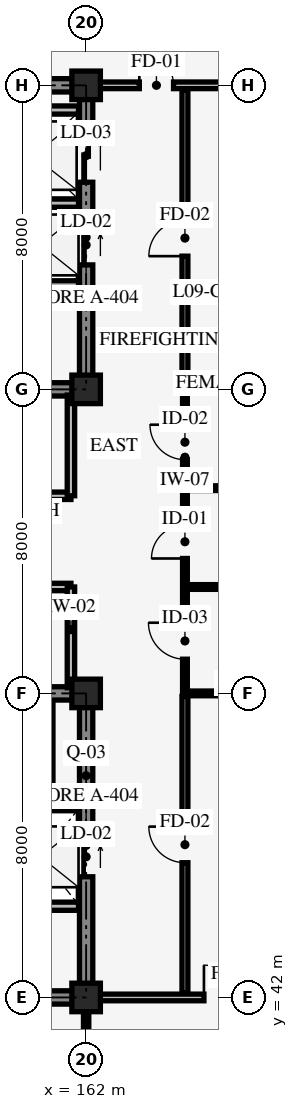
"""IFC4 building model, lengths in metres.
Left out: names, types, materials, properties, quantities, classifications, styles, units other than length and angle.
Written with IfcOpenShell. Run it as: python <this file> out.ifc"""

import sys

from ifc_helpers import new_model, si_unit, direction, frame, frame_2d, origin, origin_2d, place, context, subcontext, project, spatial, rectangle, extrude, element, fill, save


model = new_model("IFC4")
c1 = context("Model", 3, precision=1e-05, world=origin(), true_north=direction((0.0, 1.0)))
c2 = subcontext(c1, "Body", "Model", "MODEL_VIEW")
j1 = project(units=[si_unit("LENGTHUNIT", "METRE"), si_unit("PLANEANGLEUNIT", "RADIAN")], contexts=[c1])
p1 = place(None, origin())
s1 = spatial("IfcSite", under=j1, at=p1, CompositionType="ELEMENT")
p2 = place(p1, origin())
s2 = spatial("IfcBuilding", under=s1, at=p2, CompositionType="ELEMENT")
p3 = place(p2, frame((0.0, 0.0, 36.0)))
s3 = spatial("IfcBuildingStorey", under=s2, at=p3, CompositionType="ELEMENT", Elevation=36.0)
p4 = place(p3, frame((154.0, 42.0, 0.0), z_axis=(0.0, 0.0, 1.0), x_axis=(1.0, 0.0, 0.0)))
e1 = element("IfcWall", 1, at=p4, inside=s3, PredefinedType="SHEAR", context=c2, shape_type="SweptSolid", body=[
    extrude(rectangle(XDim=8.0, YDim=0.35, at=frame_2d((4.0, 0.0))), origin(), (0.0, 0.0, 1.0), 3.95),
])
p5 = place(p3, frame((162.0, 42.0, 0.0), z_axis=(0.0, 0.0, 1.0), x_axis=(0.0, 1.0, 0.0)))
e2 = element("IfcWall", 2, at=p5, inside=s3, PredefinedType="SHEAR", context=c2, shape_type="SweptSolid", body=[
    extrude(rectangle(XDim=8.0, YDim=0.35, at=frame_2d((4.0, 0.0))), origin(), (0.0, 0.0, 1.0), 3.95),
])
p6 = place(p5, frame((3.175, 0.0, 0.0)))
e3 = element("IfcOpeningElement", 3, at=p6, cuts=e2, PredefinedType="OPENING", context=c2, shape_type="SweptSolid", body=[
    extrude(rectangle(XDim=1.05, YDim=2.2, at=frame_2d((0.525, 1.1))), frame((0.0, 0.185, 0.0), z_axis=(0.0, -1.0, 0.0), x_axis=(1.0, 0.0, 0.0)), (0.0, 0.0, 1.0), 0.37),
])
p7 = place(p3, frame((162.0, 50.0, 0.0), z_axis=(0.0, 0.0, 1.0), x_axis=(-1.0, 0.0, 0.0)))
e4 = element("IfcWall", 4, at=p7, inside=s3, PredefinedType="SHEAR", context=c2, shape_type="SweptSolid", body=[
    extrude(rectangle(XDim=8.0, YDim=0.35, at=frame_2d((4.0, 0.0))), origin(), (0.0, 0.0, 1.0), 3.95),
])
p8 = place(p7, frame((5.3, 0.0, 0.0)))
e5 = element("IfcOpeningElement", 5, at=p8, cuts=e4, PredefinedType="OPENING", context=c2, shape_type="SweptSolid", body=[
    extrude(rectangle(XDim=1.3, YDim=2.15, at=frame_2d((0.65, 1.075))), frame((0.0, 0.185, 0.0), z_axis=(0.0, -1.0, 0.0), x_axis=(1.0, 0.0, 0.0)), (0.0, 0.0, 1.0), 0.37),
])
p9 = place(p7, frame((1.45, 0.0, 0.0)))
e6 = element("IfcOpeningElement", 6, at=p9, cuts=e4, PredefinedType="OPENING", context=c2, shape_type="SweptSolid", body=[
    extrude(rectangle(XDim=1.1, YDim=2.2, at=frame_2d((0.55, 1.1))), frame((0.0, 0.185, 0.0), z_axis=(0.0, -1.0, 0.0), x_axis=(1.0, 0.0, 0.0)), (0.0, 0.0, 1.0), 0.37),
])
p10 = place(p3, frame((154.0, 58.0, 0.0), z_axis=(0.0, 0.0, 1.0), x_axis=(1.0, 0.0, 0.0)))
e7 = element("IfcWall", 7, at=p10, inside=s3, PredefinedType="SHEAR", context=c2, shape_type="SweptSolid", body=[
    extrude(rectangle(XDim=8.0, YDim=0.35, at=frame_2d((4.0, 0.0))), origin(), (0.0, 0.0, 1.0), 3.95),
])
p11 = place(p10, frame((1.4, 0.0, 0.0)))
e8 = element("IfcOpeningElement", 8, at=p11, cuts=e7, PredefinedType="OPENING", context=c2, shape_type="SweptSolid", body=[
    extrude(rectangle(XDim=1.3, YDim=2.15, at=frame_2d((0.65, 1.075))), frame((0.0, 0.185, 0.0), z_axis=(0.0, -1.0, 0.0), x_axis=(1.0, 0.0, 0.0)), (0.0, 0.0, 1.0), 0.37),
])
p12 = place(p10, frame((5.3, 0.0, 0.0)))
e9 = element("IfcOpeningElement", 9, at=p12, cuts=e7, PredefinedType="OPENING", context=c2, shape_type="SweptSolid", body=[
    extrude(rectangle(XDim=1.1, YDim=2.2, at=frame_2d((0.55, 1.1))), frame((0.0, 0.185, 0.0), z_axis=(0.0, -1.0, 0.0), x_axis=(1.0, 0.0, 0.0)), (0.0, 0.0, 1.0), 0.37),
])
p13 = place(p3, frame((162.0, 58.0, 0.0), z_axis=(0.0, 0.0, 1.0), x_axis=(0.0, 1.0, 0.0)))
e10 = element("IfcWall", 10, at=p13, inside=s3, PredefinedType="SHEAR", context=c2, shape_type="SweptSolid", body=[
    extrude(rectangle(XDim=8.0, YDim=0.35, at=frame_2d((4.0, 0.0))), origin(), (0.0, 0.0, 1.0), 3.95),
])
p14 = place(p13, frame((3.275, 0.0, 0.0)))
e11 = element("IfcOpeningElement", 11, at=p14, cuts=e10, PredefinedType="OPENING", context=c2, shape_type="SweptSolid", body=[
    extrude(rectangle(XDim=1.05, YDim=2.2, at=frame_2d((0.525, 1.1))), frame((0.0, 0.185, 0.0), z_axis=(0.0, -1.0, 0.0), x_axis=(1.0, 0.0, 0.0)), (0.0, 0.0, 1.0), 0.37),
])
p15 = place(p13, frame((5.45, 0.0, 0.0)))
e12 = element("IfcOpeningElement", 12, at=p15, cuts=e10, PredefinedType="OPENING", context=c2, shape_type="SweptSolid", body=[
    extrude(rectangle(XDim=1.4, YDim=2.3, at=frame_2d((0.7, 1.15))), frame((0.0, 0.185, 0.0), z_axis=(0.0, -1.0, 0.0), x_axis=(1.0, 0.0, 0.0)), (0.0, 0.0, 1.0), 0.37),
])
p16 = place(p3, frame((162.0, 66.0, 0.0), z_axis=(0.0, 0.0, 1.0), x_axis=(-1.0, 0.0, 0.0)))
e13 = element("IfcWall", 13, at=p16, inside=s3, PredefinedType="SHEAR", context=c2, shape_type="SweptSolid", body=[
    extrude(rectangle(XDim=8.0, YDim=0.35, at=frame_2d((4.0, 0.0))), origin(), (0.0, 0.0, 1.0), 3.95),
])
for number, where, z_axis, x_axis in (
    (14, (162.0, 42.0, 0.0), (0.0, 0.0, 1.0), (1.0, 0.0, 0.0)),
    (15, (162.0, 50.0, 0.0), (0.0, 0.0, 1.0), (1.0, 0.0, 0.0)),
    (16, (162.0, 58.0, 0.0), (0.0, 0.0, 1.0), (1.0, 0.0, 0.0)),
    (17, (162.0, 66.0, 0.0), (0.0, 0.0, 1.0), (1.0, 0.0, 0.0)),
):
    element("IfcColumn", number, at=place(p3, frame(where, z_axis=z_axis, x_axis=x_axis)), inside=s3, PredefinedType="COLUMN", context=c2, shape_type="SweptSolid", body=[
        extrude(rectangle(XDim=0.75, YDim=0.75, at=origin_2d()), origin(), (0.0, 0.0, 1.0), 4.2),
    ])
p17 = place(p3, frame((158.45, 47.02, 0.0), z_axis=(0.0, 0.0, 1.0), x_axis=(1.0, 0.0, 0.0)))
e18 = element("IfcWall", 18, at=p17, inside=s3, PredefinedType="STANDARD", context=c2, shape_type="SweptSolid", body=[
    extrude(rectangle(XDim=3.35, YDim=0.215, at=frame_2d((1.675, 0.0))), origin(), (0.0, 0.0, 1.0), 3.9),
])
p18 = place(p3, frame((161.02, 47.02, 0.0), z_axis=(0.0, 0.0, 1.0), x_axis=(0.0, 1.0, 0.0)))
e19 = element("IfcWall", 19, at=p18, inside=s3, PredefinedType="STANDARD", context=c2, shape_type="SweptSolid", body=[
    extrude(rectangle(XDim=2.78, YDim=0.215, at=frame_2d((1.39, 0.0))), origin(), (0.0, 0.0, 1.0), 3.9),
])
p19 = place(p3, frame((159.78, 44.4, 0.0), z_axis=(0.0, 0.0, 1.0), x_axis=(1.0, 0.0, 0.0)))
e20 = element("IfcWall", 20, at=p19, inside=s3, PredefinedType="STANDARD", context=c2, shape_type="SweptSolid", body=[
    extrude(rectangle(XDim=2.02, YDim=0.215, at=frame_2d((1.01, 0.0))), origin(), (0.0, 0.0, 1.0), 3.9),
])
p20 = place(p3, frame((158.45, 62.9, 0.0), z_axis=(0.0, 0.0, 1.0), x_axis=(1.0, 0.0, 0.0)))
e21 = element("IfcWall", 21, at=p20, inside=s3, PredefinedType="STANDARD", context=c2, shape_type="SweptSolid", body=[
    extrude(rectangle(XDim=3.35, YDim=0.215, at=frame_2d((1.675, 0.0))), origin(), (0.0, 0.0, 1.0), 3.9),
])
p21 = place(p3, frame((159.38, 65.35, 0.0), z_axis=(0.0, 0.0, 1.0), x_axis=(1.0, 0.0, 0.0)))
e22 = element("IfcWall", 22, at=p21, inside=s3, PredefinedType="STANDARD", context=c2, shape_type="SweptSolid", body=[
    extrude(rectangle(XDim=2.42, YDim=0.215, at=frame_2d((1.21, 0.0))), origin(), (0.0, 0.0, 1.0), 3.9),
])
p22 = place(p3, frame((158.45, 60.75, 0.0), z_axis=(0.0, 0.0, 1.0), x_axis=(1.0, 0.0, 0.0)))
e23 = element("IfcWall", 23, at=p22, inside=s3, PredefinedType="STANDARD", context=c2, shape_type="SweptSolid", body=[
    extrude(rectangle(XDim=3.35, YDim=0.215, at=frame_2d((1.675, 0.0))), origin(), (0.0, 0.0, 1.0), 3.9),
])
p23 = place(p3, frame((154.0, 52.8, 0.0), z_axis=(0.0, 0.0, 1.0), x_axis=(1.0, 0.0, 0.0)))
e24 = element("IfcWall", 24, at=p23, inside=s3, PredefinedType="STANDARD", context=c2, shape_type="SweptSolid", body=[
    extrude(rectangle(XDim=7.6, YDim=0.195, at=frame_2d((3.8, 0.0))), origin(), (0.0, 0.0, 1.0), 3.9),
])
p24 = place(p23, frame((2.8, 0.0, 0.0)))
e25 = element("IfcOpeningElement", 25, at=p24, cuts=e24, PredefinedType="OPENING", context=c2, shape_type="SweptSolid", body=[
    extrude(rectangle(XDim=1.35, YDim=2.15, at=frame_2d((0.675, 1.075))), frame((0.0, 0.107, 0.0), z_axis=(0.0, -1.0, 0.0), x_axis=(1.0, 0.0, 0.0)), (0.0, 0.0, 1.0), 0.215),
])
p25 = place(p3, frame((161.6, 50.15, 0.0), z_axis=(0.0, 0.0, 1.0), x_axis=(0.0, 1.0, 0.0)))
e26 = element("IfcWall", 26, at=p25, inside=s3, PredefinedType="STANDARD", context=c2, shape_type="SweptSolid", body=[
    extrude(rectangle(XDim=2.65, YDim=0.195, at=frame_2d((1.325, 0.0))), origin(), (0.0, 0.0, 1.0), 3.14),
])
p26 = place(p3, frame((154.0, 55.2, 0.0), z_axis=(0.0, 0.0, 1.0), x_axis=(1.0, 0.0, 0.0)))
e27 = element("IfcWall", 27, at=p26, inside=s3, PredefinedType="STANDARD", context=c2, shape_type="SweptSolid", body=[
    extrude(rectangle(XDim=7.6, YDim=0.195, at=frame_2d((3.8, 0.0))), origin(), (0.0, 0.0, 1.0), 3.9),
])
p27 = place(p26, frame((2.8, 0.0, 0.0)))
e28 = element("IfcOpeningElement", 28, at=p27, cuts=e27, PredefinedType="OPENING", context=c2, shape_type="SweptSolid", body=[
    extrude(rectangle(XDim=1.45, YDim=2.2, at=frame_2d((0.725, 1.1))), frame((0.0, 0.107, 0.0), z_axis=(0.0, -1.0, 0.0), x_axis=(1.0, 0.0, 0.0)), (0.0, 0.0, 1.0), 0.215),
])
p28 = place(p3, frame((161.6, 55.2, 0.0), z_axis=(0.0, 0.0, 1.0), x_axis=(0.0, 1.0, 0.0)))
e29 = element("IfcWall", 29, at=p28, inside=s3, PredefinedType="STANDARD", context=c2, shape_type="SweptSolid", body=[
    extrude(rectangle(XDim=2.65, YDim=0.195, at=frame_2d((1.325, 0.0))), origin(), (0.0, 0.0, 1.0), 3.14),
])
p29 = place(p3, frame((164.6, 50.0, 0.0), z_axis=(0.0, 0.0, 1.0), x_axis=(0.0, 1.0, 0.0)))
e30 = element("IfcWall", 30, at=p29, inside=s3, PredefinedType="STANDARD", context=c2, shape_type="SweptSolid", body=[
    extrude(rectangle(XDim=8.0, YDim=0.125, at=frame_2d((4.0, 0.0))), origin(), (0.0, 0.0, 1.0), 3.9),
])
p30 = place(p29, frame((0.9, 0.0, 0.0)))
e31 = element("IfcOpeningElement", 31, at=p30, cuts=e30, PredefinedType="OPENING", context=c2, shape_type="SweptSolid", body=[
    extrude(rectangle(XDim=0.96, YDim=2.08, at=frame_2d((0.48, 1.04))), frame((0.0, 0.073, 0.0), z_axis=(0.0, -1.0, 0.0), x_axis=(1.0, 0.0, 0.0)), (0.0, 0.0, 1.0), 0.145),
])
p31 = place(p29, frame((3.55, 0.0, 0.0)))
e32 = element("IfcOpeningElement", 32, at=p31, cuts=e30, PredefinedType="OPENING", context=c2, shape_type="SweptSolid", body=[
    extrude(rectangle(XDim=0.88, YDim=2.05, at=frame_2d((0.44, 1.025))), frame((0.0, 0.073, 0.0), z_axis=(0.0, -1.0, 0.0), x_axis=(1.0, 0.0, 0.0)), (0.0, 0.0, 1.0), 0.145),
])
p32 = place(p29, frame((6.15, 0.0, 0.0)))
e33 = element("IfcOpeningElement", 33, at=p32, cuts=e30, PredefinedType="OPENING", context=c2, shape_type="SweptSolid", body=[
    extrude(rectangle(XDim=0.92, YDim=2.05, at=frame_2d((0.46, 1.025))), frame((0.0, 0.073, 0.0), z_axis=(0.0, -1.0, 0.0), x_axis=(1.0, 0.0, 0.0)), (0.0, 0.0, 1.0), 0.145),
])
p33 = place(p3, frame((164.6, 50.0, 0.0), z_axis=(0.0, 0.0, 1.0), x_axis=(1.0, 0.0, 0.0)))
e34 = element("IfcWall", 34, at=p33, inside=s3, PredefinedType="STANDARD", context=c2, shape_type="SweptSolid", body=[
    extrude(rectangle(XDim=3.8, YDim=0.125, at=frame_2d((1.9, 0.0))), origin(), (0.0, 0.0, 1.0), 3.09),
])
for number, where, z_axis, x_axis in (
    (35, (164.6, 52.8, 0.0), (0.0, 0.0, 1.0), (1.0, 0.0, 0.0)),
    (36, (164.6, 55.4, 0.0), (0.0, 0.0, 1.0), (1.0, 0.0, 0.0)),
):
    element("IfcWall", number, at=place(p3, frame(where, z_axis=z_axis, x_axis=x_axis)), inside=s3, PredefinedType="STANDARD", context=c2, shape_type="SweptSolid", body=[
        extrude(rectangle(XDim=3.8, YDim=0.125, at=frame_2d((1.9, 0.0))), origin(), (0.0, 0.0, 1.0), 3.9),
    ])
p34 = place(p3, frame((164.6, 58.0, 0.0), z_axis=(0.0, 0.0, 1.0), x_axis=(1.0, 0.0, 0.0)))
e37 = element("IfcWall", 37, at=p34, inside=s3, PredefinedType="STANDARD", context=c2, shape_type="SweptSolid", body=[
    extrude(rectangle(XDim=3.8, YDim=0.125, at=frame_2d((1.9, 0.0))), origin(), (0.0, 0.0, 1.0), 3.09),
])
p35 = place(p3, frame((164.6, 42.12, 0.0), z_axis=(0.0, 0.0, 1.0), x_axis=(0.0, 1.0, 0.0)))
e38 = element("IfcWall", 38, at=p35, inside=s3, PredefinedType="STANDARD", context=c2, shape_type="SweptSolid", body=[
    extrude(rectangle(XDim=7.8, YDim=0.155, at=frame_2d((3.9, 0.0))), origin(), (0.0, 0.0, 1.0), 3.9),
])
p36 = place(p35, frame((3.425, 0.0, 0.0)))
e39 = element("IfcOpeningElement", 39, at=p36, cuts=e38, PredefinedType="OPENING", context=c2, shape_type="SweptSolid", body=[
    extrude(rectangle(XDim=0.95, YDim=2.1, at=frame_2d((0.475, 1.05))), frame((0.0, 0.087, 0.0), z_axis=(0.0, -1.0, 0.0), x_axis=(1.0, 0.0, 0.0)), (0.0, 0.0, 1.0), 0.175),
])
p37 = place(p3, frame((164.6, 58.08, 0.0), z_axis=(0.0, 0.0, 1.0), x_axis=(0.0, 1.0, 0.0)))
e40 = element("IfcWall", 40, at=p37, inside=s3, PredefinedType="STANDARD", context=c2, shape_type="SweptSolid", body=[
    extrude(rectangle(XDim=7.8, YDim=0.155, at=frame_2d((3.9, 0.0))), origin(), (0.0, 0.0, 1.0), 3.9),
])
p38 = place(p37, frame((3.425, 0.0, 0.0)))
e41 = element("IfcOpeningElement", 41, at=p38, cuts=e40, PredefinedType="OPENING", context=c2, shape_type="SweptSolid", body=[
    extrude(rectangle(XDim=0.95, YDim=2.1, at=frame_2d((0.475, 1.05))), frame((0.0, 0.087, 0.0), z_axis=(0.0, -1.0, 0.0), x_axis=(1.0, 0.0, 0.0)), (0.0, 0.0, 1.0), 0.175),
])
p39 = place(p3, frame((162.0, 34.05, 0.0), z_axis=(0.0, 0.0, 1.0), x_axis=(0.0, 1.0, 0.0)))
e42 = element("IfcWall", 42, at=p39, inside=s3, PredefinedType="STANDARD", context=c2, shape_type="SweptSolid", body=[
    extrude(rectangle(XDim=7.83, YDim=0.14, at=frame_2d((3.915, 0.0))), origin(), (0.0, 0.0, 1.0), 3.14),
])
p40 = place(p39, frame((3.0, 0.0, 0.0)))
e43 = element("IfcOpeningElement", 43, at=p40, cuts=e42, PredefinedType="OPENING", context=c2, shape_type="SweptSolid", body=[
    extrude(rectangle(XDim=1.06, YDim=2.12, at=frame_2d((0.53, 1.06))), frame((0.0, 0.08, 0.0), z_axis=(0.0, -1.0, 0.0), x_axis=(1.0, 0.0, 0.0)), (0.0, 0.0, 1.0), 0.16),
])
p41 = place(p3, frame((162.35, 42.0, 0.0), z_axis=(0.0, 0.0, 1.0), x_axis=(1.0, 0.0, 0.0)))
e44 = element("IfcWall", 44, at=p41, inside=s3, PredefinedType="STANDARD", context=c2, shape_type="SweptSolid", body=[
    extrude(rectangle(XDim=14.7, YDim=0.175, at=frame_2d((7.35, 0.0))), origin(), (0.0, 0.0, 1.0), 3.09),
])
p42 = place(p41, frame((2.75, 0.0, 0.0)))
e45 = element("IfcOpeningElement", 45, at=p42, cuts=e44, PredefinedType="OPENING", context=c2, shape_type="SweptSolid", body=[
    extrude(rectangle(XDim=1.7, YDim=2.3, at=frame_2d((0.85, 1.15))), frame((0.0, 0.098, 0.0), z_axis=(0.0, -1.0, 0.0), x_axis=(1.0, 0.0, 0.0)), (0.0, 0.0, 1.0), 0.195),
])
p43 = place(p3, frame((162.35, 66.0, 0.0), z_axis=(0.0, 0.0, 1.0), x_axis=(1.0, 0.0, 0.0)))
e46 = element("IfcWall", 46, at=p43, inside=s3, PredefinedType="STANDARD", context=c2, shape_type="SweptSolid", body=[
    extrude(rectangle(XDim=14.7, YDim=0.175, at=frame_2d((7.35, 0.0))), origin(), (0.0, 0.0, 1.0), 3.09),
])
p44 = place(p43, frame((1.05, 0.0, 0.0)))
e47 = element("IfcOpeningElement", 47, at=p44, cuts=e46, PredefinedType="OPENING", context=c2, shape_type="SweptSolid", body=[
    extrude(rectangle(XDim=0.9, YDim=2.1, at=frame_2d((0.45, 1.05))), frame((0.0, 0.098, 0.0), z_axis=(0.0, -1.0, 0.0), x_axis=(1.0, 0.0, 0.0)), (0.0, 0.0, 1.0), 0.195),
])
p45 = place(p6, origin())
e48 = element("IfcDoor", 48, at=p45, inside=s3, OperationType="SLIDING_TO_LEFT", PredefinedType="DOOR", context=c2, shape_type="SweptSolid", body=[
    extrude(rectangle(XDim=1.05, YDim=2.2, at=frame_2d((0.525, 1.1))), frame((0.0, 0.025, 0.0), z_axis=(0.0, -1.0, 0.0), x_axis=(1.0, 0.0, 0.0)), (0.0, 0.0, 1.0), 0.05),
])
fill(e3, e48)
p46 = place(p14, origin())
e49 = element("IfcDoor", 49, at=p46, inside=s3, OperationType="SLIDING_TO_RIGHT", PredefinedType="DOOR", context=c2, shape_type="SweptSolid", body=[
    extrude(rectangle(XDim=1.05, YDim=2.2, at=frame_2d((0.525, 1.1))), frame((0.0, 0.025, 0.0), z_axis=(0.0, -1.0, 0.0), x_axis=(1.0, 0.0, 0.0)), (0.0, 0.0, 1.0), 0.05),
])
fill(e11, e49)
p47 = place(p15, origin())
e50 = element("IfcDoor", 50, at=p47, inside=s3, OperationType="DOUBLE_DOOR_SLIDING", PredefinedType="DOOR", context=c2, shape_type="SweptSolid", body=[
    extrude(rectangle(XDim=1.4, YDim=2.3, at=frame_2d((0.7, 1.15))), frame((0.0, 0.025, 0.0), z_axis=(0.0, -1.0, 0.0), x_axis=(1.0, 0.0, 0.0)), (0.0, 0.0, 1.0), 0.05),
])
fill(e12, e50)
p48 = place(p30, origin())
e51 = element("IfcDoor", 51, at=p48, inside=s3, OperationType="SINGLE_SWING_RIGHT", PredefinedType="DOOR", context=c2, shape_type="SweptSolid", body=[
    extrude(rectangle(XDim=0.96, YDim=2.08, at=frame_2d((0.48, 1.04))), frame((0.0, 0.025, 0.0), z_axis=(0.0, -1.0, 0.0), x_axis=(1.0, 0.0, 0.0)), (0.0, 0.0, 1.0), 0.05),
])
fill(e31, e51)
p49 = place(p31, origin())
e52 = element("IfcDoor", 52, at=p49, inside=s3, OperationType="SINGLE_SWING_LEFT", PredefinedType="DOOR", context=c2, shape_type="SweptSolid", body=[
    extrude(rectangle(XDim=0.88, YDim=2.05, at=frame_2d((0.44, 1.025))), frame((0.0, 0.025, 0.0), z_axis=(0.0, -1.0, 0.0), x_axis=(1.0, 0.0, 0.0)), (0.0, 0.0, 1.0), 0.05),
])
fill(e32, e52)
p50 = place(p32, origin())
e53 = element("IfcDoor", 53, at=p50, inside=s3, OperationType="SINGLE_SWING_RIGHT", PredefinedType="DOOR", context=c2, shape_type="SweptSolid", body=[
    extrude(rectangle(XDim=0.92, YDim=2.05, at=frame_2d((0.46, 1.025))), frame((0.0, 0.025, 0.0), z_axis=(0.0, -1.0, 0.0), x_axis=(1.0, 0.0, 0.0)), (0.0, 0.0, 1.0), 0.05),
])
fill(e33, e53)
p51 = place(p36, origin())
e54 = element("IfcDoor", 54, at=p51, inside=s3, OperationType="SINGLE_SWING_RIGHT", PredefinedType="DOOR", context=c2, shape_type="SweptSolid", body=[
    extrude(rectangle(XDim=0.95, YDim=2.1, at=frame_2d((0.475, 1.05))), frame((0.0, 0.025, 0.0), z_axis=(0.0, -1.0, 0.0), x_axis=(1.0, 0.0, 0.0)), (0.0, 0.0, 1.0), 0.05),
])
fill(e39, e54)
p52 = place(p38, origin())
e55 = element("IfcDoor", 55, at=p52, inside=s3, OperationType="SINGLE_SWING_LEFT", PredefinedType="DOOR", context=c2, shape_type="SweptSolid", body=[
    extrude(rectangle(XDim=0.95, YDim=2.1, at=frame_2d((0.475, 1.05))), frame((0.0, 0.025, 0.0), z_axis=(0.0, -1.0, 0.0), x_axis=(1.0, 0.0, 0.0)), (0.0, 0.0, 1.0), 0.05),
])
fill(e41, e55)
p53 = place(p42, origin())
e56 = element("IfcDoor", 56, at=p53, inside=s3, OperationType="DOUBLE_DOOR_SINGLE_SWING", PredefinedType="DOOR", context=c2, shape_type="SweptSolid", body=[
    extrude(rectangle(XDim=1.7, YDim=2.3, at=frame_2d((0.85, 1.15))), frame((0.0, 0.025, 0.0), z_axis=(0.0, -1.0, 0.0), x_axis=(1.0, 0.0, 0.0)), (0.0, 0.0, 1.0), 0.05),
])
fill(e45, e56)
p54 = place(p44, origin())
e57 = element("IfcDoor", 57, at=p54, inside=s3, OperationType="SINGLE_SWING_LEFT", PredefinedType="DOOR", context=c2, shape_type="SweptSolid", body=[
    extrude(rectangle(XDim=0.9, YDim=2.1, at=frame_2d((0.45, 1.05))), frame((0.0, 0.025, 0.0), z_axis=(0.0, -1.0, 0.0), x_axis=(1.0, 0.0, 0.0)), (0.0, 0.0, 1.0), 0.05),
])
fill(e47, e57)
save(model, sys.argv[1])
